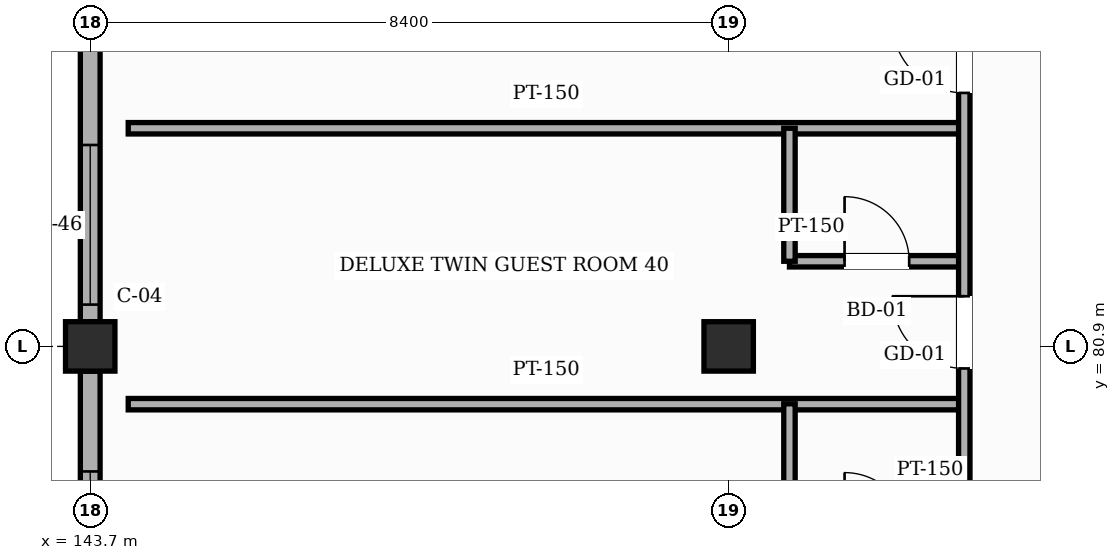
"""IFC4 building model, lengths in metres.
Left out: names, types, materials, properties, quantities, classifications, styles, units other than length and angle.
Written with IfcOpenShell. Run it as: python <this file> out.ifc"""

import sys

from ifc_helpers import new_model, si_unit, direction, frame, frame_2d, origin, origin_2d, place, context, subcontext, project, spatial, rectangle, hollow_rectangle, extrude, element, fill, save


model = new_model("IFC4")
c1 = context("Model", 3, precision=1e-05, world=origin(), true_north=direction((0.0, 1.0)))
c2 = subcontext(c1, "Body", "Model", "MODEL_VIEW")
j1 = project(units=[si_unit("LENGTHUNIT", "METRE"), si_unit("PLANEANGLEUNIT", "RADIAN")], contexts=[c1])
p1 = place(None, origin())
s1 = spatial("IfcSite", under=j1, at=p1, CompositionType="ELEMENT")
p2 = place(p1, origin())
s2 = spatial("IfcBuilding", under=s1, at=p2, CompositionType="ELEMENT")
p3 = place(p2, frame((0.0, 0.0, 19.8)))
s3 = spatial("IfcBuildingStorey", under=s2, at=p3, CompositionType="ELEMENT", Elevation=19.8)
p4 = place(p3, frame((143.7, 80.9, 0.0), z_axis=(0.0, 0.0, 1.0), x_axis=(1.0, 0.0, 0.0)))
e1 = element("IfcColumn", 1, at=p4, inside=s3, PredefinedType="COLUMN", context=c2, shape_type="SweptSolid", body=[
    extrude(hollow_rectangle(XDim=0.65, YDim=0.65, WallThickness=0.025, InnerFilletRadius=0.025, OuterFilletRadius=0.05, at=origin_2d()), origin(), (0.0, 0.0, 1.0), 4.8),
])
p5 = place(p3, frame((152.1, 80.9, -0.24), z_axis=(0.0, 0.0, 1.0), x_axis=(1.0, 0.0, 0.0)))
e2 = element("IfcColumn", 2, at=p5, inside=s3, PredefinedType="COLUMN", context=c2, shape_type="SweptSolid", body=[
    extrude(hollow_rectangle(XDim=0.65, YDim=0.65, WallThickness=0.025, InnerFilletRadius=0.025, OuterFilletRadius=0.05, at=origin_2d()), origin(), (0.0, 0.0, 1.0), 5.04),
])
p6 = place(p3, frame((143.7, 73.675, 0.0), z_axis=(0.0, 0.0, 1.0), x_axis=(0.0, 1.0, 0.0)))
e3 = element("IfcWall", 3, at=p6, inside=s3, PredefinedType="SOLIDWALL", context=c2, shape_type="SweptSolid", body=[
    extrude(rectangle(XDim=6.9, YDim=0.26, at=frame_2d((3.45, 0.0))), origin(), (0.0, 0.0, 1.0), 4.005),
])
p7 = place(p6, frame((0.595, 0.0, 0.85)))
e4 = element("IfcOpeningElement", 4, at=p7, cuts=e3, PredefinedType="OPENING", context=c2, shape_type="SweptSolid", body=[
    extrude(rectangle(XDim=1.65, YDim=1.35, at=frame_2d((0.825, 0.675))), frame((0.0, 0.14, 0.0), z_axis=(0.0, -1.0, 0.0), x_axis=(1.0, 0.0, 0.0)), (0.0, 0.0, 1.0), 0.28),
])
p8 = place(p6, frame((3.73, 0.0, 0.85)))
e5 = element("IfcOpeningElement", 5, at=p8, cuts=e3, PredefinedType="OPENING", context=c2, shape_type="SweptSolid", body=[
    extrude(rectangle(XDim=1.85, YDim=1.35, at=frame_2d((0.925, 0.675))), frame((0.0, 0.14, 0.0), z_axis=(0.0, -1.0, 0.0), x_axis=(1.0, 0.0, 0.0)), (0.0, 0.0, 1.0), 0.28),
])
p9 = place(p3, frame((143.7, 81.225, 0.0), z_axis=(0.0, 0.0, 1.0), x_axis=(0.0, 1.0, 0.0)))
e6 = element("IfcWall", 6, at=p9, inside=s3, PredefinedType="SOLIDWALL", context=c2, shape_type="SweptSolid", body=[
    extrude(rectangle(XDim=7.35, YDim=0.26, at=frame_2d((3.675, 0.0))), origin(), (0.0, 0.0, 1.0), 4.005),
])
p10 = place(p9, frame((0.225, 0.0, 0.85)))
e7 = element("IfcOpeningElement", 7, at=p10, cuts=e6, PredefinedType="OPENING", context=c2, shape_type="SweptSolid", body=[
    extrude(rectangle(XDim=2.1, YDim=1.35, at=frame_2d((1.05, 0.675))), frame((0.0, 0.14, 0.0), z_axis=(0.0, -1.0, 0.0), x_axis=(1.0, 0.0, 0.0)), (0.0, 0.0, 1.0), 0.28),
])
p11 = place(p9, frame((3.785, 0.0, 0.85)))
e8 = element("IfcOpeningElement", 8, at=p11, cuts=e6, PredefinedType="OPENING", context=c2, shape_type="SweptSolid", body=[
    extrude(rectangle(XDim=1.15, YDim=1.5, at=frame_2d((0.575, 0.75))), frame((0.0, 0.14, 0.0), z_axis=(0.0, -1.0, 0.0), x_axis=(1.0, 0.0, 0.0)), (0.0, 0.0, 1.0), 0.28),
])
p12 = place(p3, frame((144.2, 80.14, 0.0), z_axis=(0.0, 0.0, 1.0), x_axis=(1.0, 0.0, 0.0)))
e9 = element("IfcWall", 9, at=p12, inside=s3, PredefinedType="PARTITIONING", context=c2, shape_type="SweptSolid", body=[
    extrude(rectangle(XDim=11.0, YDim=0.15, at=frame_2d((5.5, 0.0))), origin(), (0.0, 0.0, 1.0), 4.565),
])
p13 = place(p3, frame((152.9, 82.02, 0.0), z_axis=(0.0, 0.0, 1.0), x_axis=(1.0, 0.0, 0.0)))
e10 = element("IfcWall", 10, at=p13, inside=s3, PredefinedType="PARTITIONING", context=c2, shape_type="SweptSolid", body=[
    extrude(rectangle(XDim=2.3, YDim=0.15, at=frame_2d((1.15, 0.0))), origin(), (0.0, 0.0, 1.0), 4.565),
])
p14 = place(p13, frame((0.725, 0.0, 0.0)))
e11 = element("IfcOpeningElement", 11, at=p14, cuts=e10, PredefinedType="OPENING", context=c2, shape_type="SweptSolid", body=[
    extrude(rectangle(XDim=0.85, YDim=2.1, at=frame_2d((0.425, 1.05))), frame((0.0, 0.085, 0.0), z_axis=(0.0, -1.0, 0.0), x_axis=(1.0, 0.0, 0.0)), (0.0, 0.0, 1.0), 0.17),
])
p15 = place(p3, frame((144.2, 83.77, 0.0), z_axis=(0.0, 0.0, 1.0), x_axis=(1.0, 0.0, 0.0)))
e12 = element("IfcWall", 12, at=p15, inside=s3, PredefinedType="PARTITIONING", context=c2, shape_type="SweptSolid", body=[
    extrude(rectangle(XDim=11.0, YDim=0.15, at=frame_2d((5.5, 0.0))), origin(), (0.0, 0.0, 1.0), 4.565),
])
for number, where, z_axis, x_axis in (
    (13, (152.9, 78.395, 0.0), (0.0, 0.0, 1.0), (0.0, 1.0, 0.0)),
    (14, (152.9, 82.02, 0.0), (0.0, 0.0, 1.0), (0.0, 1.0, 0.0)),
):
    element("IfcWall", number, at=place(p3, frame(where, z_axis=z_axis, x_axis=x_axis)), inside=s3, PredefinedType="PARTITIONING", context=c2, shape_type="SweptSolid", body=[
        extrude(rectangle(XDim=1.75, YDim=0.15, at=frame_2d((0.875, 0.0))), origin(), (0.0, 0.0, 1.0), 4.565),
    ])
p16 = place(p3, frame((155.2, 62.0, 0.0), z_axis=(0.0, 0.0, 1.0), x_axis=(0.0, 1.0, 0.0)))
e15 = element("IfcWall", 15, at=p16, inside=s3, PredefinedType="PARTITIONING", context=c2, shape_type="SweptSolid", body=[
    extrude(rectangle(XDim=50.8, YDim=0.15, at=frame_2d((25.4, 0.0))), origin(), (0.0, 0.0, 1.0), 4.565),
])
p17 = place(p16, frame((0.465, 0.0, 0.0)))
e16 = element("IfcOpeningElement", 16, at=p17, cuts=e15, PredefinedType="OPENING", context=c2, shape_type="SweptSolid", body=[
    extrude(rectangle(XDim=0.95, YDim=2.15, at=frame_2d((0.475, 1.075))), frame((0.0, 0.085, 0.0), z_axis=(0.0, -1.0, 0.0), x_axis=(1.0, 0.0, 0.0)), (0.0, 0.0, 1.0), 0.17),
])
p18 = place(p16, frame((4.09, 0.0, 0.0)))
e17 = element("IfcOpeningElement", 17, at=p18, cuts=e15, PredefinedType="OPENING", context=c2, shape_type="SweptSolid", body=[
    extrude(rectangle(XDim=0.95, YDim=2.15, at=frame_2d((0.475, 1.075))), frame((0.0, 0.085, 0.0), z_axis=(0.0, -1.0, 0.0), x_axis=(1.0, 0.0, 0.0)), (0.0, 0.0, 1.0), 0.17),
])
p19 = place(p16, frame((7.72, 0.0, 0.0)))
e18 = element("IfcOpeningElement", 18, at=p19, cuts=e15, PredefinedType="OPENING", context=c2, shape_type="SweptSolid", body=[
    extrude(rectangle(XDim=0.95, YDim=2.15, at=frame_2d((0.475, 1.075))), frame((0.0, 0.085, 0.0), z_axis=(0.0, -1.0, 0.0), x_axis=(1.0, 0.0, 0.0)), (0.0, 0.0, 1.0), 0.17),
])
p20 = place(p16, frame((11.35, 0.0, 0.0)))
e19 = element("IfcOpeningElement", 19, at=p20, cuts=e15, PredefinedType="OPENING", context=c2, shape_type="SweptSolid", body=[
    extrude(rectangle(XDim=0.95, YDim=2.15, at=frame_2d((0.475, 1.075))), frame((0.0, 0.085, 0.0), z_axis=(0.0, -1.0, 0.0), x_axis=(1.0, 0.0, 0.0)), (0.0, 0.0, 1.0), 0.17),
])
p21 = place(p16, frame((14.98, 0.0, 0.0)))
e20 = element("IfcOpeningElement", 20, at=p21, cuts=e15, PredefinedType="OPENING", context=c2, shape_type="SweptSolid", body=[
    extrude(rectangle(XDim=0.95, YDim=2.15, at=frame_2d((0.475, 1.075))), frame((0.0, 0.085, 0.0), z_axis=(0.0, -1.0, 0.0), x_axis=(1.0, 0.0, 0.0)), (0.0, 0.0, 1.0), 0.17),
])
p22 = place(p16, frame((18.61, 0.0, 0.0)))
e21 = element("IfcOpeningElement", 21, at=p22, cuts=e15, PredefinedType="OPENING", context=c2, shape_type="SweptSolid", body=[
    extrude(rectangle(XDim=0.95, YDim=2.15, at=frame_2d((0.475, 1.075))), frame((0.0, 0.085, 0.0), z_axis=(0.0, -1.0, 0.0), x_axis=(1.0, 0.0, 0.0)), (0.0, 0.0, 1.0), 0.17),
])
p23 = place(p16, frame((22.235, 0.0, 0.0)))
e22 = element("IfcOpeningElement", 22, at=p23, cuts=e15, PredefinedType="OPENING", context=c2, shape_type="SweptSolid", body=[
    extrude(rectangle(XDim=0.95, YDim=2.15, at=frame_2d((0.475, 1.075))), frame((0.0, 0.085, 0.0), z_axis=(0.0, -1.0, 0.0), x_axis=(1.0, 0.0, 0.0)), (0.0, 0.0, 1.0), 0.17),
])
p24 = place(p16, frame((25.865, 0.0, 0.0)))
e23 = element("IfcOpeningElement", 23, at=p24, cuts=e15, PredefinedType="OPENING", context=c2, shape_type="SweptSolid", body=[
    extrude(rectangle(XDim=0.95, YDim=2.15, at=frame_2d((0.475, 1.075))), frame((0.0, 0.085, 0.0), z_axis=(0.0, -1.0, 0.0), x_axis=(1.0, 0.0, 0.0)), (0.0, 0.0, 1.0), 0.17),
])
p25 = place(p16, frame((29.49, 0.0, 0.0)))
e24 = element("IfcOpeningElement", 24, at=p25, cuts=e15, PredefinedType="OPENING", context=c2, shape_type="SweptSolid", body=[
    extrude(rectangle(XDim=0.95, YDim=2.15, at=frame_2d((0.475, 1.075))), frame((0.0, 0.085, 0.0), z_axis=(0.0, -1.0, 0.0), x_axis=(1.0, 0.0, 0.0)), (0.0, 0.0, 1.0), 0.17),
])
p26 = place(p16, frame((33.12, 0.0, 0.0)))
e25 = element("IfcOpeningElement", 25, at=p26, cuts=e15, PredefinedType="OPENING", context=c2, shape_type="SweptSolid", body=[
    extrude(rectangle(XDim=0.95, YDim=2.15, at=frame_2d((0.475, 1.075))), frame((0.0, 0.085, 0.0), z_axis=(0.0, -1.0, 0.0), x_axis=(1.0, 0.0, 0.0)), (0.0, 0.0, 1.0), 0.17),
])
p27 = place(p16, frame((36.75, 0.0, 0.0)))
e26 = element("IfcOpeningElement", 26, at=p27, cuts=e15, PredefinedType="OPENING", context=c2, shape_type="SweptSolid", body=[
    extrude(rectangle(XDim=0.95, YDim=2.15, at=frame_2d((0.475, 1.075))), frame((0.0, 0.085, 0.0), z_axis=(0.0, -1.0, 0.0), x_axis=(1.0, 0.0, 0.0)), (0.0, 0.0, 1.0), 0.17),
])
p28 = place(p16, frame((40.38, 0.0, 0.0)))
e27 = element("IfcOpeningElement", 27, at=p28, cuts=e15, PredefinedType="OPENING", context=c2, shape_type="SweptSolid", body=[
    extrude(rectangle(XDim=0.95, YDim=2.15, at=frame_2d((0.475, 1.075))), frame((0.0, 0.085, 0.0), z_axis=(0.0, -1.0, 0.0), x_axis=(1.0, 0.0, 0.0)), (0.0, 0.0, 1.0), 0.17),
])
p29 = place(p16, frame((44.01, 0.0, 0.0)))
e28 = element("IfcOpeningElement", 28, at=p29, cuts=e15, PredefinedType="OPENING", context=c2, shape_type="SweptSolid", body=[
    extrude(rectangle(XDim=0.95, YDim=2.15, at=frame_2d((0.475, 1.075))), frame((0.0, 0.085, 0.0), z_axis=(0.0, -1.0, 0.0), x_axis=(1.0, 0.0, 0.0)), (0.0, 0.0, 1.0), 0.17),
])
p30 = place(p16, frame((47.635, 0.0, 0.0)))
e29 = element("IfcOpeningElement", 29, at=p30, cuts=e15, PredefinedType="OPENING", context=c2, shape_type="SweptSolid", body=[
    extrude(rectangle(XDim=0.95, YDim=2.15, at=frame_2d((0.475, 1.075))), frame((0.0, 0.085, 0.0), z_axis=(0.0, -1.0, 0.0), x_axis=(1.0, 0.0, 0.0)), (0.0, 0.0, 1.0), 0.17),
])
p31 = place(p8, origin())
e30 = element("IfcWindow", 30, at=p31, inside=s3, PartitioningType="SINGLE_PANEL", PredefinedType="WINDOW", context=c2, shape_type="SweptSolid", body=[
    extrude(rectangle(XDim=1.85, YDim=1.35, at=frame_2d((0.925, 0.675))), frame((0.0, 0.03, 0.0), z_axis=(0.0, -1.0, 0.0), x_axis=(1.0, 0.0, 0.0)), (0.0, 0.0, 1.0), 0.06),
])
fill(e5, e30)
p32 = place(p10, origin())
e31 = element("IfcWindow", 31, at=p32, inside=s3, PartitioningType="SINGLE_PANEL", PredefinedType="WINDOW", context=c2, shape_type="SweptSolid", body=[
    extrude(rectangle(XDim=2.1, YDim=1.35, at=frame_2d((1.05, 0.675))), frame((0.0, 0.03, 0.0), z_axis=(0.0, -1.0, 0.0), x_axis=(1.0, 0.0, 0.0)), (0.0, 0.0, 1.0), 0.06),
])
fill(e7, e31)
p33 = place(p22, origin())
e32 = element("IfcDoor", 32, at=p33, inside=s3, OperationType="SINGLE_SWING_RIGHT", PredefinedType="DOOR", context=c2, shape_type="SweptSolid", body=[
    extrude(rectangle(XDim=0.95, YDim=2.15, at=frame_2d((0.475, 1.075))), frame((0.0, 0.025, 0.0), z_axis=(0.0, -1.0, 0.0), x_axis=(1.0, 0.0, 0.0)), (0.0, 0.0, 1.0), 0.05),
])
fill(e21, e32)
p34 = place(p14, origin())
e33 = element("IfcDoor", 33, at=p34, inside=s3, OperationType="SINGLE_SWING_LEFT", PredefinedType="DOOR", context=c2, shape_type="SweptSolid", body=[
    extrude(rectangle(XDim=0.85, YDim=2.1, at=frame_2d((0.425, 1.05))), frame((0.0, 0.025, 0.0), z_axis=(0.0, -1.0, 0.0), x_axis=(1.0, 0.0, 0.0)), (0.0, 0.0, 1.0), 0.05),
])
fill(e11, e33)
p35 = place(p23, origin())
e34 = element("IfcDoor", 34, at=p35, inside=s3, OperationType="SINGLE_SWING_RIGHT", PredefinedType="DOOR", context=c2, shape_type="SweptSolid", body=[
    extrude(rectangle(XDim=0.95, YDim=2.15, at=frame_2d((0.475, 1.075))), frame((0.0, 0.025, 0.0), z_axis=(0.0, -1.0, 0.0), x_axis=(1.0, 0.0, 0.0)), (0.0, 0.0, 1.0), 0.05),
])
fill(e22, e34)
save(model, sys.argv[1])
